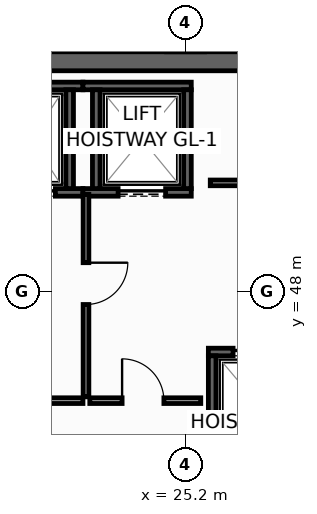
"""IFC4 building model, lengths in metres.
Left out: names, types, materials, properties, quantities, classifications, styles, units other than length and angle.
Written with IfcOpenShell. Run it as: python <this file> out.ifc"""

import sys

from ifc_helpers import new_model, si_unit, direction, frame, frame_2d, origin, place, context, subcontext, project, spatial, rectangle, extrude, element, fill, save


model = new_model("IFC4")
c1 = context("Model", 3, precision=1e-05, world=origin(), true_north=direction((0.0, 1.0)))
c2 = subcontext(c1, "Body", "Model", "MODEL_VIEW")
j1 = project(units=[si_unit("LENGTHUNIT", "METRE"), si_unit("PLANEANGLEUNIT", "RADIAN")], contexts=[c1])
p1 = place(None, origin())
s1 = spatial("IfcSite", under=j1, at=p1, CompositionType="ELEMENT")
p2 = place(p1, origin())
s2 = spatial("IfcBuilding", under=s1, at=p2, CompositionType="ELEMENT")
p3 = place(p2, frame((0.0, 0.0, 148.6)))
s3 = spatial("IfcBuildingStorey", under=s2, at=p3, CompositionType="ELEMENT", Elevation=148.6)
p4 = place(p3, frame((13.6, 54.05, 0.0), z_axis=(0.0, 0.0, 1.0), x_axis=(1.0, 0.0, 0.0)))
e1 = element("IfcWall", 1, at=p4, inside=s3, PredefinedType="SHEAR", context=c2, shape_type="SweptSolid", body=[
    extrude(rectangle(XDim=32.7, YDim=0.5, at=frame_2d((16.35, 0.0))), origin(), (0.0, 0.0, 1.0), 3.55),
])
p5 = place(p3, frame((19.85, 50.6, 0.0), z_axis=(0.0, 0.0, 1.0), x_axis=(1.0, 0.0, 0.0)))
e2 = element("IfcWall", 2, at=p5, inside=s3, PredefinedType="SHEAR", context=c2, shape_type="SweptSolid", body=[
    extrude(rectangle(XDim=2.65, YDim=0.2, at=frame_2d((1.325, 0.0))), origin(), (0.0, 0.0, 1.0), 3.55),
])
p6 = place(p5, frame((0.675, 0.0, 0.0)))
e3 = element("IfcOpeningElement", 3, at=p6, cuts=e2, PredefinedType="OPENING", context=c2, shape_type="SweptSolid", body=[
    extrude(rectangle(XDim=1.25, YDim=2.3, at=frame_2d((0.625, 1.15))), frame((0.0, 0.11, 0.0), z_axis=(0.0, -1.0, 0.0), x_axis=(1.0, 0.0, 0.0)), (0.0, 0.0, 1.0), 0.22),
])
p7 = place(p3, frame((19.85, 53.4, 0.0), z_axis=(0.0, 0.0, 1.0), x_axis=(1.0, 0.0, 0.0)))
e4 = element("IfcWall", 4, at=p7, inside=s3, PredefinedType="SHEAR", context=c2, shape_type="SweptSolid", body=[
    extrude(rectangle(XDim=2.65, YDim=0.2, at=frame_2d((1.325, 0.0))), origin(), (0.0, 0.0, 1.0), 3.55),
])
p8 = place(p3, frame((22.15, 50.7, 0.0), z_axis=(0.0, 0.0, 1.0), x_axis=(0.0, 1.0, 0.0)))
e5 = element("IfcWall", 5, at=p8, inside=s3, PredefinedType="SHEAR", context=c2, shape_type="SweptSolid", body=[
    extrude(rectangle(XDim=2.6, YDim=0.2, at=frame_2d((1.3, 0.0))), origin(), (0.0, 0.0, 1.0), 3.55),
])
p9 = place(p3, frame((22.5, 50.6, 0.0), z_axis=(0.0, 0.0, 1.0), x_axis=(1.0, 0.0, 0.0)))
e6 = element("IfcWall", 6, at=p9, inside=s3, PredefinedType="SHEAR", context=c2, shape_type="SweptSolid", body=[
    extrude(rectangle(XDim=2.85, YDim=0.2, at=frame_2d((1.425, 0.0))), origin(), (0.0, 0.0, 1.0), 3.55),
])
p10 = place(p9, frame((0.925, 0.0, 0.0)))
e7 = element("IfcOpeningElement", 7, at=p10, cuts=e6, PredefinedType="OPENING", context=c2, shape_type="SweptSolid", body=[
    extrude(rectangle(XDim=1.25, YDim=2.3, at=frame_2d((0.625, 1.15))), frame((0.0, 0.11, 0.0), z_axis=(0.0, -1.0, 0.0), x_axis=(1.0, 0.0, 0.0)), (0.0, 0.0, 1.0), 0.22),
])
p11 = place(p3, frame((22.5, 53.4, 0.0), z_axis=(0.0, 0.0, 1.0), x_axis=(1.0, 0.0, 0.0)))
e8 = element("IfcWall", 8, at=p11, inside=s3, PredefinedType="SHEAR", context=c2, shape_type="SweptSolid", body=[
    extrude(rectangle(XDim=2.85, YDim=0.2, at=frame_2d((1.425, 0.0))), origin(), (0.0, 0.0, 1.0), 3.55),
])
for number, where, z_axis, x_axis in (
    (9, (22.85, 50.7, 0.0), (0.0, 0.0, 1.0), (0.0, 1.0, 0.0)),
    (10, (25.25, 50.7, 0.0), (0.0, 0.0, 1.0), (0.0, 1.0, 0.0)),
):
    element("IfcWall", number, at=place(p3, frame(where, z_axis=z_axis, x_axis=x_axis)), inside=s3, PredefinedType="SHEAR", context=c2, shape_type="SweptSolid", body=[
        extrude(rectangle(XDim=2.6, YDim=0.2, at=frame_2d((1.3, 0.0))), origin(), (0.0, 0.0, 1.0), 3.55),
    ])
p12 = place(p3, frame((25.8, 46.4, 0.0), z_axis=(0.0, 0.0, 1.0), x_axis=(1.0, 0.0, 0.0)))
e11 = element("IfcWall", 11, at=p12, inside=s3, PredefinedType="SHEAR", context=c2, shape_type="SweptSolid", body=[
    extrude(rectangle(XDim=2.575, YDim=0.2, at=frame_2d((1.288, 0.0))), origin(), (0.0, 0.0, 1.0), 3.55),
])
p13 = place(p12, frame((0.65, 0.0, 0.0)))
e12 = element("IfcOpeningElement", 12, at=p13, cuts=e11, PredefinedType="OPENING", context=c2, shape_type="SweptSolid", body=[
    extrude(rectangle(XDim=1.1, YDim=2.2, at=frame_2d((0.55, 1.1))), frame((0.0, 0.11, 0.0), z_axis=(0.0, -1.0, 0.0), x_axis=(1.0, 0.0, 0.0)), (0.0, 0.0, 1.0), 0.22),
])
p14 = place(p3, frame((25.9, 44.0, 0.0), z_axis=(0.0, 0.0, 1.0), x_axis=(0.0, 1.0, 0.0)))
e13 = element("IfcWall", 13, at=p14, inside=s3, PredefinedType="SHEAR", context=c2, shape_type="SweptSolid", body=[
    extrude(rectangle(XDim=2.3, YDim=0.2, at=frame_2d((1.15, 0.0))), origin(), (0.0, 0.0, 1.0), 3.55),
])
p15 = place(p3, frame((17.36, 45.12, 0.0), z_axis=(0.0, 0.0, 1.0), x_axis=(1.0, 0.0, 0.0)))
e14 = element("IfcWall", 14, at=p15, inside=s3, PredefinedType="PARTITIONING", context=c2, shape_type="SweptSolid", body=[
    extrude(rectangle(XDim=5.14, YDim=0.15, at=frame_2d((2.57, 0.0))), origin(), (0.0, 0.0, 1.0), 3.55),
])
p16 = place(p15, frame((1.8, 0.0, 0.0)))
e15 = element("IfcOpeningElement", 15, at=p16, cuts=e14, PredefinedType="OPENING", context=c2, shape_type="SweptSolid", body=[
    extrude(rectangle(XDim=1.1, YDim=2.15, at=frame_2d((0.55, 1.075))), frame((0.0, 0.085, 0.0), z_axis=(0.0, -1.0, 0.0), x_axis=(1.0, 0.0, 0.0)), (0.0, 0.0, 1.0), 0.17),
])
p17 = place(p3, frame((22.58, 50.55, 0.0), z_axis=(0.0, 0.0, 1.0), x_axis=(0.0, -1.0, 0.0)))
e16 = element("IfcWall", 16, at=p17, inside=s3, PredefinedType="PARTITIONING", context=c2, shape_type="SweptSolid", body=[
    extrude(rectangle(XDim=5.33, YDim=0.15, at=frame_2d((2.665, 0.0))), origin(), (0.0, 0.0, 1.0), 3.55),
])
p18 = place(p17, frame((1.8, 0.0, 0.0)))
e17 = element("IfcOpeningElement", 17, at=p18, cuts=e16, PredefinedType="OPENING", context=c2, shape_type="SweptSolid", body=[
    extrude(rectangle(XDim=1.1, YDim=2.15, at=frame_2d((0.55, 1.075))), frame((0.0, 0.085, 0.0), z_axis=(0.0, -1.0, 0.0), x_axis=(1.0, 0.0, 0.0)), (0.0, 0.0, 1.0), 0.17),
])
p19 = place(p3, frame((22.68, 45.12, 0.0), z_axis=(0.0, 0.0, 1.0), x_axis=(1.0, 0.0, 0.0)))
e18 = element("IfcWall", 18, at=p19, inside=s3, PredefinedType="PARTITIONING", context=c2, shape_type="SweptSolid", body=[
    extrude(rectangle(XDim=2.92, YDim=0.15, at=frame_2d((1.46, 0.0))), origin(), (0.0, 0.0, 1.0), 3.55),
])
p20 = place(p19, frame((0.85, 0.0, 0.0)))
e19 = element("IfcOpeningElement", 19, at=p20, cuts=e18, PredefinedType="OPENING", context=c2, shape_type="SweptSolid", body=[
    extrude(rectangle(XDim=1.1, YDim=2.15, at=frame_2d((0.55, 1.075))), frame((0.0, 0.085, 0.0), z_axis=(0.0, -1.0, 0.0), x_axis=(1.0, 0.0, 0.0)), (0.0, 0.0, 1.0), 0.17),
])
p21 = place(p3, frame((25.85, 50.85, 0.0), z_axis=(0.0, 0.0, 1.0), x_axis=(1.0, 0.0, 0.0)))
e20 = element("IfcWall", 20, at=p21, inside=s3, PredefinedType="PARTITIONING", context=c2, shape_type="SweptSolid", body=[
    extrude(rectangle(XDim=7.65, YDim=0.15, at=frame_2d((3.825, 0.0))), origin(), (0.0, 0.0, 1.0), 3.55),
])
p22 = place(p21, frame((1.25, 0.0, 0.0)))
e21 = element("IfcOpeningElement", 21, at=p22, cuts=e20, PredefinedType="OPENING", context=c2, shape_type="SweptSolid", body=[
    extrude(rectangle(XDim=0.95, YDim=2.15, at=frame_2d((0.475, 1.075))), frame((0.0, 0.085, 0.0), z_axis=(0.0, -1.0, 0.0), x_axis=(1.0, 0.0, 0.0)), (0.0, 0.0, 1.0), 0.17),
])
p23 = place(p21, frame((5.05, 0.0, 0.0)))
e22 = element("IfcOpeningElement", 22, at=p23, cuts=e20, PredefinedType="OPENING", context=c2, shape_type="SweptSolid", body=[
    extrude(rectangle(XDim=0.95, YDim=2.15, at=frame_2d((0.475, 1.075))), frame((0.0, 0.085, 0.0), z_axis=(0.0, -1.0, 0.0), x_axis=(1.0, 0.0, 0.0)), (0.0, 0.0, 1.0), 0.17),
])
p24 = place(p6, origin())
e23 = element("IfcDoor", 23, at=p24, inside=s3, OperationType="SLIDING_TO_LEFT", PredefinedType="DOOR", context=c2, shape_type="SweptSolid", body=[
    extrude(rectangle(XDim=1.25, YDim=2.3, at=frame_2d((0.625, 1.15))), frame((0.0, 0.025, 0.0), z_axis=(0.0, -1.0, 0.0), x_axis=(1.0, 0.0, 0.0)), (0.0, 0.0, 1.0), 0.05),
])
fill(e3, e23)
p25 = place(p10, origin())
e24 = element("IfcDoor", 24, at=p25, inside=s3, OperationType="SLIDING_TO_LEFT", PredefinedType="DOOR", context=c2, shape_type="SweptSolid", body=[
    extrude(rectangle(XDim=1.25, YDim=2.3, at=frame_2d((0.625, 1.15))), frame((0.0, 0.025, 0.0), z_axis=(0.0, -1.0, 0.0), x_axis=(1.0, 0.0, 0.0)), (0.0, 0.0, 1.0), 0.05),
])
fill(e7, e24)
p26 = place(p13, origin())
e25 = element("IfcDoor", 25, at=p26, inside=s3, OperationType="SLIDING_TO_LEFT", PredefinedType="DOOR", context=c2, shape_type="SweptSolid", body=[
    extrude(rectangle(XDim=1.1, YDim=2.2, at=frame_2d((0.55, 1.1))), frame((0.0, 0.025, 0.0), z_axis=(0.0, -1.0, 0.0), x_axis=(1.0, 0.0, 0.0)), (0.0, 0.0, 1.0), 0.05),
])
fill(e12, e25)
p27 = place(p18, origin())
e26 = element("IfcDoor", 26, at=p27, inside=s3, OperationType="SINGLE_SWING_LEFT", PredefinedType="DOOR", context=c2, shape_type="SweptSolid", body=[
    extrude(rectangle(XDim=1.1, YDim=2.15, at=frame_2d((0.55, 1.075))), frame((0.0, 0.025, 0.0), z_axis=(0.0, -1.0, 0.0), x_axis=(1.0, 0.0, 0.0)), (0.0, 0.0, 1.0), 0.05),
])
fill(e17, e26)
p28 = place(p20, origin())
e27 = element("IfcDoor", 27, at=p28, inside=s3, OperationType="SINGLE_SWING_LEFT", PredefinedType="DOOR", context=c2, shape_type="SweptSolid", body=[
    extrude(rectangle(XDim=1.1, YDim=2.15, at=frame_2d((0.55, 1.075))), frame((0.0, 0.025, 0.0), z_axis=(0.0, -1.0, 0.0), x_axis=(1.0, 0.0, 0.0)), (0.0, 0.0, 1.0), 0.05),
])
fill(e19, e27)
save(model, sys.argv[1])
